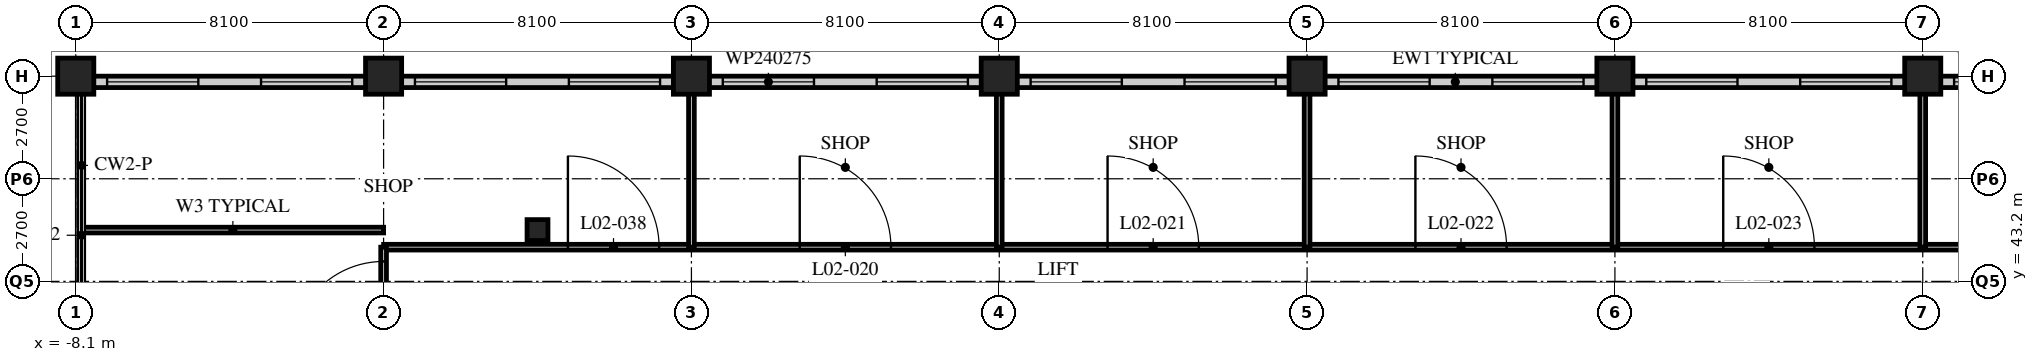
"""IFC4 building model, lengths in metres.
Left out: names, types, materials, properties, quantities, classifications, styles, units other than length and angle.
Written with IfcOpenShell. Run it as: python <this file> out.ifc"""

import sys

from ifc_helpers import new_model, si_unit, direction, frame, frame_2d, origin, origin_2d, place, context, subcontext, project, spatial, rectangle, hollow_rectangle, extrude, element, fill, save


model = new_model("IFC4")
c1 = context("Model", 3, precision=1e-05, world=origin(), true_north=direction((0.0, 1.0)))
c2 = subcontext(c1, "Body", "Model", "MODEL_VIEW")
j1 = project(units=[si_unit("LENGTHUNIT", "METRE"), si_unit("PLANEANGLEUNIT", "RADIAN")], contexts=[c1])
p1 = place(None, origin())
s1 = spatial("IfcSite", under=j1, at=p1, CompositionType="ELEMENT")
p2 = place(p1, origin())
s2 = spatial("IfcBuilding", under=s1, at=p2, CompositionType="ELEMENT")
p3 = place(p2, frame((0.0, 0.0, 11.4)))
s3 = spatial("IfcBuildingStorey", under=s2, at=p3, CompositionType="ELEMENT", Elevation=11.4)
for number, where, z_axis, x_axis in (
    (1, (-8.1, 48.6, 0.0), (0.0, 0.0, 1.0), (1.0, 0.0, 0.0)),
    (2, (0.0, 48.6, 0.0), (0.0, 0.0, 1.0), (1.0, 0.0, 0.0)),
):
    element("IfcColumn", number, at=place(p3, frame(where, z_axis=z_axis, x_axis=x_axis)), inside=s3, PredefinedType="COLUMN", context=c2, shape_type="SweptSolid", body=[
        extrude(hollow_rectangle(XDim=0.95, YDim=0.95, WallThickness=0.1, at=origin_2d()), origin(), (0.0, 0.0, 1.0), 5.4),
    ])
p4 = place(p3, frame((4.05, 44.55, 0.0), z_axis=(0.0, 0.0, 1.0), x_axis=(1.0, 0.0, 0.0)))
e3 = element("IfcColumn", 3, at=p4, inside=s3, PredefinedType="COLUMN", context=c2, shape_type="SweptSolid", body=[
    extrude(hollow_rectangle(XDim=0.55, YDim=0.55, WallThickness=0.05, at=origin_2d()), origin(), (0.0, 0.0, 1.0), 5.4),
])
for number, where, z_axis, x_axis in (
    (4, (8.1, 48.6, 0.0), (0.0, 0.0, 1.0), (1.0, 0.0, 0.0)),
    (5, (16.2, 48.6, 0.0), (0.0, 0.0, 1.0), (1.0, 0.0, 0.0)),
    (6, (24.3, 48.6, 0.0), (0.0, 0.0, 1.0), (1.0, 0.0, 0.0)),
    (7, (32.4, 48.6, 0.0), (0.0, 0.0, 1.0), (1.0, 0.0, 0.0)),
    (8, (40.5, 48.6, 0.0), (0.0, 0.0, 1.0), (1.0, 0.0, 0.0)),
):
    element("IfcColumn", number, at=place(p3, frame(where, z_axis=z_axis, x_axis=x_axis)), inside=s3, PredefinedType="COLUMN", context=c2, shape_type="SweptSolid", body=[
        extrude(hollow_rectangle(XDim=0.95, YDim=0.95, WallThickness=0.1, at=origin_2d()), origin(), (0.0, 0.0, 1.0), 5.4),
    ])
p5 = place(p3, frame((64.5, 48.45, 0.0), z_axis=(0.0, 0.0, 1.0), x_axis=(-1.0, 0.0, 0.0)))
e9 = element("IfcWall", 9, at=p5, inside=s3, PredefinedType="SOLIDWALL", context=c2, shape_type="SweptSolid", body=[
    extrude(rectangle(XDim=72.6, YDim=0.3, at=frame_2d((36.3, 0.0))), origin(), (0.0, 0.0, 1.0), 5.15),
])
p6 = place(p5, frame((0.525, 0.0, 1.0)))
e10 = element("IfcOpeningElement", 10, at=p6, cuts=e9, PredefinedType="OPENING", context=c2, shape_type="SweptSolid", body=[
    extrude(rectangle(XDim=2.4, YDim=2.75, at=frame_2d((1.2, 1.375))), frame((0.0, 0.16, 0.0), z_axis=(0.0, -1.0, 0.0), x_axis=(1.0, 0.0, 0.0)), (0.0, 0.0, 1.0), 0.32),
])
p7 = place(p5, frame((4.575, 0.0, 1.0)))
e11 = element("IfcOpeningElement", 11, at=p7, cuts=e9, PredefinedType="OPENING", context=c2, shape_type="SweptSolid", body=[
    extrude(rectangle(XDim=2.4, YDim=2.75, at=frame_2d((1.2, 1.375))), frame((0.0, 0.16, 0.0), z_axis=(0.0, -1.0, 0.0), x_axis=(1.0, 0.0, 0.0)), (0.0, 0.0, 1.0), 0.32),
])
p8 = place(p5, frame((8.625, 0.0, 1.0)))
e12 = element("IfcOpeningElement", 12, at=p8, cuts=e9, PredefinedType="OPENING", context=c2, shape_type="SweptSolid", body=[
    extrude(rectangle(XDim=2.4, YDim=2.75, at=frame_2d((1.2, 1.375))), frame((0.0, 0.16, 0.0), z_axis=(0.0, -1.0, 0.0), x_axis=(1.0, 0.0, 0.0)), (0.0, 0.0, 1.0), 0.32),
])
p9 = place(p5, frame((12.675, 0.0, 1.0)))
e13 = element("IfcOpeningElement", 13, at=p9, cuts=e9, PredefinedType="OPENING", context=c2, shape_type="SweptSolid", body=[
    extrude(rectangle(XDim=2.4, YDim=2.75, at=frame_2d((1.2, 1.375))), frame((0.0, 0.16, 0.0), z_axis=(0.0, -1.0, 0.0), x_axis=(1.0, 0.0, 0.0)), (0.0, 0.0, 1.0), 0.32),
])
p10 = place(p5, frame((16.725, 0.0, 1.0)))
e14 = element("IfcOpeningElement", 14, at=p10, cuts=e9, PredefinedType="OPENING", context=c2, shape_type="SweptSolid", body=[
    extrude(rectangle(XDim=2.4, YDim=2.75, at=frame_2d((1.2, 1.375))), frame((0.0, 0.16, 0.0), z_axis=(0.0, -1.0, 0.0), x_axis=(1.0, 0.0, 0.0)), (0.0, 0.0, 1.0), 0.32),
])
p11 = place(p5, frame((20.775, 0.0, 1.0)))
e15 = element("IfcOpeningElement", 15, at=p11, cuts=e9, PredefinedType="OPENING", context=c2, shape_type="SweptSolid", body=[
    extrude(rectangle(XDim=2.4, YDim=2.75, at=frame_2d((1.2, 1.375))), frame((0.0, 0.16, 0.0), z_axis=(0.0, -1.0, 0.0), x_axis=(1.0, 0.0, 0.0)), (0.0, 0.0, 1.0), 0.32),
])
p12 = place(p5, frame((24.825, 0.0, 1.0)))
e16 = element("IfcOpeningElement", 16, at=p12, cuts=e9, PredefinedType="OPENING", context=c2, shape_type="SweptSolid", body=[
    extrude(rectangle(XDim=2.4, YDim=2.75, at=frame_2d((1.2, 1.375))), frame((0.0, 0.16, 0.0), z_axis=(0.0, -1.0, 0.0), x_axis=(1.0, 0.0, 0.0)), (0.0, 0.0, 1.0), 0.32),
])
p13 = place(p5, frame((28.875, 0.0, 1.0)))
e17 = element("IfcOpeningElement", 17, at=p13, cuts=e9, PredefinedType="OPENING", context=c2, shape_type="SweptSolid", body=[
    extrude(rectangle(XDim=2.4, YDim=2.75, at=frame_2d((1.2, 1.375))), frame((0.0, 0.16, 0.0), z_axis=(0.0, -1.0, 0.0), x_axis=(1.0, 0.0, 0.0)), (0.0, 0.0, 1.0), 0.32),
])
p14 = place(p5, frame((32.925, 0.0, 1.0)))
e18 = element("IfcOpeningElement", 18, at=p14, cuts=e9, PredefinedType="OPENING", context=c2, shape_type="SweptSolid", body=[
    extrude(rectangle(XDim=2.4, YDim=2.75, at=frame_2d((1.2, 1.375))), frame((0.0, 0.16, 0.0), z_axis=(0.0, -1.0, 0.0), x_axis=(1.0, 0.0, 0.0)), (0.0, 0.0, 1.0), 0.32),
])
p15 = place(p5, frame((36.975, 0.0, 1.0)))
e19 = element("IfcOpeningElement", 19, at=p15, cuts=e9, PredefinedType="OPENING", context=c2, shape_type="SweptSolid", body=[
    extrude(rectangle(XDim=2.4, YDim=2.75, at=frame_2d((1.2, 1.375))), frame((0.0, 0.16, 0.0), z_axis=(0.0, -1.0, 0.0), x_axis=(1.0, 0.0, 0.0)), (0.0, 0.0, 1.0), 0.32),
])
p16 = place(p5, frame((41.025, 0.0, 1.0)))
e20 = element("IfcOpeningElement", 20, at=p16, cuts=e9, PredefinedType="OPENING", context=c2, shape_type="SweptSolid", body=[
    extrude(rectangle(XDim=2.4, YDim=2.75, at=frame_2d((1.2, 1.375))), frame((0.0, 0.16, 0.0), z_axis=(0.0, -1.0, 0.0), x_axis=(1.0, 0.0, 0.0)), (0.0, 0.0, 1.0), 0.32),
])
p17 = place(p5, frame((45.075, 0.0, 1.0)))
e21 = element("IfcOpeningElement", 21, at=p17, cuts=e9, PredefinedType="OPENING", context=c2, shape_type="SweptSolid", body=[
    extrude(rectangle(XDim=2.4, YDim=2.75, at=frame_2d((1.2, 1.375))), frame((0.0, 0.16, 0.0), z_axis=(0.0, -1.0, 0.0), x_axis=(1.0, 0.0, 0.0)), (0.0, 0.0, 1.0), 0.32),
])
p18 = place(p5, frame((49.125, 0.0, 1.0)))
e22 = element("IfcOpeningElement", 22, at=p18, cuts=e9, PredefinedType="OPENING", context=c2, shape_type="SweptSolid", body=[
    extrude(rectangle(XDim=2.4, YDim=2.75, at=frame_2d((1.2, 1.375))), frame((0.0, 0.16, 0.0), z_axis=(0.0, -1.0, 0.0), x_axis=(1.0, 0.0, 0.0)), (0.0, 0.0, 1.0), 0.32),
])
p19 = place(p5, frame((53.175, 0.0, 1.0)))
e23 = element("IfcOpeningElement", 23, at=p19, cuts=e9, PredefinedType="OPENING", context=c2, shape_type="SweptSolid", body=[
    extrude(rectangle(XDim=2.4, YDim=2.75, at=frame_2d((1.2, 1.375))), frame((0.0, 0.16, 0.0), z_axis=(0.0, -1.0, 0.0), x_axis=(1.0, 0.0, 0.0)), (0.0, 0.0, 1.0), 0.32),
])
p20 = place(p5, frame((57.225, 0.0, 1.0)))
e24 = element("IfcOpeningElement", 24, at=p20, cuts=e9, PredefinedType="OPENING", context=c2, shape_type="SweptSolid", body=[
    extrude(rectangle(XDim=2.4, YDim=2.75, at=frame_2d((1.2, 1.375))), frame((0.0, 0.16, 0.0), z_axis=(0.0, -1.0, 0.0), x_axis=(1.0, 0.0, 0.0)), (0.0, 0.0, 1.0), 0.32),
])
p21 = place(p5, frame((61.275, 0.0, 1.0)))
e25 = element("IfcOpeningElement", 25, at=p21, cuts=e9, PredefinedType="OPENING", context=c2, shape_type="SweptSolid", body=[
    extrude(rectangle(XDim=2.4, YDim=2.75, at=frame_2d((1.2, 1.375))), frame((0.0, 0.16, 0.0), z_axis=(0.0, -1.0, 0.0), x_axis=(1.0, 0.0, 0.0)), (0.0, 0.0, 1.0), 0.32),
])
p22 = place(p5, frame((65.325, 0.0, 1.0)))
e26 = element("IfcOpeningElement", 26, at=p22, cuts=e9, PredefinedType="OPENING", context=c2, shape_type="SweptSolid", body=[
    extrude(rectangle(XDim=2.4, YDim=2.75, at=frame_2d((1.2, 1.375))), frame((0.0, 0.16, 0.0), z_axis=(0.0, -1.0, 0.0), x_axis=(1.0, 0.0, 0.0)), (0.0, 0.0, 1.0), 0.32),
])
p23 = place(p5, frame((69.375, 0.0, 1.0)))
e27 = element("IfcOpeningElement", 27, at=p23, cuts=e9, PredefinedType="OPENING", context=c2, shape_type="SweptSolid", body=[
    extrude(rectangle(XDim=2.4, YDim=2.75, at=frame_2d((1.2, 1.375))), frame((0.0, 0.16, 0.0), z_axis=(0.0, -1.0, 0.0), x_axis=(1.0, 0.0, 0.0)), (0.0, 0.0, 1.0), 0.32),
])
p24 = place(p3, frame((0.0, 44.1, 0.0), z_axis=(0.0, 0.0, 1.0), x_axis=(1.0, 0.0, 0.0)))
e28 = element("IfcWall", 28, at=p24, inside=s3, PredefinedType="PARTITIONING", context=c2, shape_type="SweptSolid", body=[
    extrude(rectangle(XDim=56.7, YDim=0.15, at=frame_2d((28.35, 0.0))), origin(), (0.0, 0.0, 1.0), 5.15),
])
p25 = place(p24, frame((10.95, 0.0, 0.0)))
e29 = element("IfcOpeningElement", 29, at=p25, cuts=e28, PredefinedType="OPENING", context=c2, shape_type="SweptSolid", body=[
    extrude(rectangle(XDim=2.4, YDim=2.7, at=frame_2d((1.2, 1.35))), frame((0.0, 0.085, 0.0), z_axis=(0.0, -1.0, 0.0), x_axis=(1.0, 0.0, 0.0)), (0.0, 0.0, 1.0), 0.17),
])
p26 = place(p24, frame((19.05, 0.0, 0.0)))
e30 = element("IfcOpeningElement", 30, at=p26, cuts=e28, PredefinedType="OPENING", context=c2, shape_type="SweptSolid", body=[
    extrude(rectangle(XDim=2.4, YDim=2.7, at=frame_2d((1.2, 1.35))), frame((0.0, 0.085, 0.0), z_axis=(0.0, -1.0, 0.0), x_axis=(1.0, 0.0, 0.0)), (0.0, 0.0, 1.0), 0.17),
])
p27 = place(p24, frame((27.15, 0.0, 0.0)))
e31 = element("IfcOpeningElement", 31, at=p27, cuts=e28, PredefinedType="OPENING", context=c2, shape_type="SweptSolid", body=[
    extrude(rectangle(XDim=2.4, YDim=2.7, at=frame_2d((1.2, 1.35))), frame((0.0, 0.085, 0.0), z_axis=(0.0, -1.0, 0.0), x_axis=(1.0, 0.0, 0.0)), (0.0, 0.0, 1.0), 0.17),
])
p28 = place(p24, frame((35.25, 0.0, 0.0)))
e32 = element("IfcOpeningElement", 32, at=p28, cuts=e28, PredefinedType="OPENING", context=c2, shape_type="SweptSolid", body=[
    extrude(rectangle(XDim=2.4, YDim=2.7, at=frame_2d((1.2, 1.35))), frame((0.0, 0.085, 0.0), z_axis=(0.0, -1.0, 0.0), x_axis=(1.0, 0.0, 0.0)), (0.0, 0.0, 1.0), 0.17),
])
p29 = place(p24, frame((43.35, 0.0, 0.0)))
e33 = element("IfcOpeningElement", 33, at=p29, cuts=e28, PredefinedType="OPENING", context=c2, shape_type="SweptSolid", body=[
    extrude(rectangle(XDim=2.4, YDim=2.7, at=frame_2d((1.2, 1.35))), frame((0.0, 0.085, 0.0), z_axis=(0.0, -1.0, 0.0), x_axis=(1.0, 0.0, 0.0)), (0.0, 0.0, 1.0), 0.17),
])
p30 = place(p24, frame((53.45, 0.0, 0.0)))
e34 = element("IfcOpeningElement", 34, at=p30, cuts=e28, PredefinedType="OPENING", context=c2, shape_type="SweptSolid", body=[
    extrude(rectangle(XDim=2.4, YDim=2.7, at=frame_2d((1.2, 1.35))), frame((0.0, 0.085, 0.0), z_axis=(0.0, -1.0, 0.0), x_axis=(1.0, 0.0, 0.0)), (0.0, 0.0, 1.0), 0.17),
])
p31 = place(p24, frame((4.85, 0.0, 0.0)))
e35 = element("IfcOpeningElement", 35, at=p31, cuts=e28, PredefinedType="OPENING", context=c2, shape_type="SweptSolid", body=[
    extrude(rectangle(XDim=2.4, YDim=2.7, at=frame_2d((1.2, 1.35))), frame((0.0, 0.085, 0.0), z_axis=(0.0, -1.0, 0.0), x_axis=(1.0, 0.0, 0.0)), (0.0, 0.0, 1.0), 0.17),
])
p32 = place(p3, frame((0.0, 8.1, 0.0), z_axis=(0.0, 0.0, 1.0), x_axis=(0.0, 1.0, 0.0)))
e36 = element("IfcWall", 36, at=p32, inside=s3, PredefinedType="PARTITIONING", context=c2, shape_type="SweptSolid", body=[
    extrude(rectangle(XDim=36.0, YDim=0.15, at=frame_2d((18.0, 0.0))), origin(), (0.0, 0.0, 1.0), 4.538),
])
p33 = place(p32, frame((2.85, 0.0, 0.0)))
e37 = element("IfcOpeningElement", 37, at=p33, cuts=e36, PredefinedType="OPENING", context=c2, shape_type="SweptSolid", body=[
    extrude(rectangle(XDim=2.4, YDim=2.7, at=frame_2d((1.2, 1.35))), frame((0.0, 0.085, 0.0), z_axis=(0.0, -1.0, 0.0), x_axis=(1.0, 0.0, 0.0)), (0.0, 0.0, 1.0), 0.17),
])
p34 = place(p32, frame((10.95, 0.0, 0.0)))
e38 = element("IfcOpeningElement", 38, at=p34, cuts=e36, PredefinedType="OPENING", context=c2, shape_type="SweptSolid", body=[
    extrude(rectangle(XDim=2.4, YDim=2.7, at=frame_2d((1.2, 1.35))), frame((0.0, 0.085, 0.0), z_axis=(0.0, -1.0, 0.0), x_axis=(1.0, 0.0, 0.0)), (0.0, 0.0, 1.0), 0.17),
])
p35 = place(p32, frame((19.05, 0.0, 0.0)))
e39 = element("IfcOpeningElement", 39, at=p35, cuts=e36, PredefinedType="OPENING", context=c2, shape_type="SweptSolid", body=[
    extrude(rectangle(XDim=2.4, YDim=2.7, at=frame_2d((1.2, 1.35))), frame((0.0, 0.085, 0.0), z_axis=(0.0, -1.0, 0.0), x_axis=(1.0, 0.0, 0.0)), (0.0, 0.0, 1.0), 0.17),
])
p36 = place(p32, frame((27.15, 0.0, 0.0)))
e40 = element("IfcOpeningElement", 40, at=p36, cuts=e36, PredefinedType="OPENING", context=c2, shape_type="SweptSolid", body=[
    extrude(rectangle(XDim=2.4, YDim=2.7, at=frame_2d((1.2, 1.35))), frame((0.0, 0.085, 0.0), z_axis=(0.0, -1.0, 0.0), x_axis=(1.0, 0.0, 0.0)), (0.0, 0.0, 1.0), 0.17),
])
p37 = place(p32, frame((33.225, 0.0, 0.0)))
e41 = element("IfcOpeningElement", 41, at=p37, cuts=e36, PredefinedType="OPENING", context=c2, shape_type="SweptSolid", body=[
    extrude(rectangle(XDim=2.4, YDim=2.7, at=frame_2d((1.2, 1.35))), frame((0.0, 0.085, 0.0), z_axis=(0.0, -1.0, 0.0), x_axis=(1.0, 0.0, 0.0)), (0.0, 0.0, 1.0), 0.17),
])
for number, where, z_axis, x_axis in (
    (42, (16.2, 44.1, 0.0), (0.0, 0.0, 1.0), (0.0, 1.0, 0.0)),
    (43, (24.3, 44.1, 0.0), (0.0, 0.0, 1.0), (0.0, 1.0, 0.0)),
    (44, (32.4, 44.1, 0.0), (0.0, 0.0, 1.0), (0.0, 1.0, 0.0)),
    (45, (40.5, 44.1, 0.0), (0.0, 0.0, 1.0), (0.0, 1.0, 0.0)),
):
    element("IfcWall", number, at=place(p3, frame(where, z_axis=z_axis, x_axis=x_axis)), inside=s3, PredefinedType="PARTITIONING", context=c2, shape_type="SweptSolid", body=[
        extrude(rectangle(XDim=4.2, YDim=0.15, at=frame_2d((2.1, 0.0))), origin(), (0.0, 0.0, 1.0), 4.538),
    ])
p38 = place(p3, frame((-7.932, 44.55, 0.0), z_axis=(0.0, 0.0, 1.0), x_axis=(1.0, 0.0, 0.0)))
e46 = element("IfcWall", 46, at=p38, inside=s3, PredefinedType="PARTITIONING", context=c2, shape_type="SweptSolid", body=[
    extrude(rectangle(XDim=7.932, YDim=0.15, at=frame_2d((3.966, 0.0))), origin(), (0.0, 0.0, 1.0), 5.15),
])
p39 = place(p3, frame((8.1, 44.1, 0.0), z_axis=(0.0, 0.0, 1.0), x_axis=(0.0, 1.0, 0.0)))
e47 = element("IfcWall", 47, at=p39, inside=s3, PredefinedType="PARTITIONING", context=c2, shape_type="SweptSolid", body=[
    extrude(rectangle(XDim=4.2, YDim=0.15, at=frame_2d((2.1, 0.0))), origin(), (0.0, 0.0, 1.0), 4.538),
])
p40 = place(p11, origin())
e48 = element("IfcWindow", 48, at=p40, inside=s3, PartitioningType="SINGLE_PANEL", PredefinedType="WINDOW", context=c2, shape_type="SweptSolid", body=[
    extrude(rectangle(XDim=2.4, YDim=2.75, at=frame_2d((1.2, 1.375))), frame((0.0, 0.03, 0.0), z_axis=(0.0, -1.0, 0.0), x_axis=(1.0, 0.0, 0.0)), (0.0, 0.0, 1.0), 0.06),
])
fill(e15, e48)
p41 = place(p12, origin())
e49 = element("IfcWindow", 49, at=p41, inside=s3, PartitioningType="SINGLE_PANEL", PredefinedType="WINDOW", context=c2, shape_type="SweptSolid", body=[
    extrude(rectangle(XDim=2.4, YDim=2.75, at=frame_2d((1.2, 1.375))), frame((0.0, 0.03, 0.0), z_axis=(0.0, -1.0, 0.0), x_axis=(1.0, 0.0, 0.0)), (0.0, 0.0, 1.0), 0.06),
])
fill(e16, e49)
p42 = place(p13, origin())
e50 = element("IfcWindow", 50, at=p42, inside=s3, PartitioningType="SINGLE_PANEL", PredefinedType="WINDOW", context=c2, shape_type="SweptSolid", body=[
    extrude(rectangle(XDim=2.4, YDim=2.75, at=frame_2d((1.2, 1.375))), frame((0.0, 0.03, 0.0), z_axis=(0.0, -1.0, 0.0), x_axis=(1.0, 0.0, 0.0)), (0.0, 0.0, 1.0), 0.06),
])
fill(e17, e50)
p43 = place(p14, origin())
e51 = element("IfcWindow", 51, at=p43, inside=s3, PartitioningType="SINGLE_PANEL", PredefinedType="WINDOW", context=c2, shape_type="SweptSolid", body=[
    extrude(rectangle(XDim=2.4, YDim=2.75, at=frame_2d((1.2, 1.375))), frame((0.0, 0.03, 0.0), z_axis=(0.0, -1.0, 0.0), x_axis=(1.0, 0.0, 0.0)), (0.0, 0.0, 1.0), 0.06),
])
fill(e18, e51)
p44 = place(p15, origin())
e52 = element("IfcWindow", 52, at=p44, inside=s3, PartitioningType="SINGLE_PANEL", PredefinedType="WINDOW", context=c2, shape_type="SweptSolid", body=[
    extrude(rectangle(XDim=2.4, YDim=2.75, at=frame_2d((1.2, 1.375))), frame((0.0, 0.03, 0.0), z_axis=(0.0, -1.0, 0.0), x_axis=(1.0, 0.0, 0.0)), (0.0, 0.0, 1.0), 0.06),
])
fill(e19, e52)
p45 = place(p16, origin())
e53 = element("IfcWindow", 53, at=p45, inside=s3, PartitioningType="SINGLE_PANEL", PredefinedType="WINDOW", context=c2, shape_type="SweptSolid", body=[
    extrude(rectangle(XDim=2.4, YDim=2.75, at=frame_2d((1.2, 1.375))), frame((0.0, 0.03, 0.0), z_axis=(0.0, -1.0, 0.0), x_axis=(1.0, 0.0, 0.0)), (0.0, 0.0, 1.0), 0.06),
])
fill(e20, e53)
p46 = place(p17, origin())
e54 = element("IfcWindow", 54, at=p46, inside=s3, PartitioningType="SINGLE_PANEL", PredefinedType="WINDOW", context=c2, shape_type="SweptSolid", body=[
    extrude(rectangle(XDim=2.4, YDim=2.75, at=frame_2d((1.2, 1.375))), frame((0.0, 0.03, 0.0), z_axis=(0.0, -1.0, 0.0), x_axis=(1.0, 0.0, 0.0)), (0.0, 0.0, 1.0), 0.06),
])
fill(e21, e54)
p47 = place(p18, origin())
e55 = element("IfcWindow", 55, at=p47, inside=s3, PartitioningType="SINGLE_PANEL", PredefinedType="WINDOW", context=c2, shape_type="SweptSolid", body=[
    extrude(rectangle(XDim=2.4, YDim=2.75, at=frame_2d((1.2, 1.375))), frame((0.0, 0.03, 0.0), z_axis=(0.0, -1.0, 0.0), x_axis=(1.0, 0.0, 0.0)), (0.0, 0.0, 1.0), 0.06),
])
fill(e22, e55)
p48 = place(p19, origin())
e56 = element("IfcWindow", 56, at=p48, inside=s3, PartitioningType="SINGLE_PANEL", PredefinedType="WINDOW", context=c2, shape_type="SweptSolid", body=[
    extrude(rectangle(XDim=2.4, YDim=2.75, at=frame_2d((1.2, 1.375))), frame((0.0, 0.03, 0.0), z_axis=(0.0, -1.0, 0.0), x_axis=(1.0, 0.0, 0.0)), (0.0, 0.0, 1.0), 0.06),
])
fill(e23, e56)
p49 = place(p20, origin())
e57 = element("IfcWindow", 57, at=p49, inside=s3, PartitioningType="SINGLE_PANEL", PredefinedType="WINDOW", context=c2, shape_type="SweptSolid", body=[
    extrude(rectangle(XDim=2.4, YDim=2.75, at=frame_2d((1.2, 1.375))), frame((0.0, 0.03, 0.0), z_axis=(0.0, -1.0, 0.0), x_axis=(1.0, 0.0, 0.0)), (0.0, 0.0, 1.0), 0.06),
])
fill(e24, e57)
p50 = place(p21, origin())
e58 = element("IfcWindow", 58, at=p50, inside=s3, PartitioningType="SINGLE_PANEL", PredefinedType="WINDOW", context=c2, shape_type="SweptSolid", body=[
    extrude(rectangle(XDim=2.4, YDim=2.75, at=frame_2d((1.2, 1.375))), frame((0.0, 0.03, 0.0), z_axis=(0.0, -1.0, 0.0), x_axis=(1.0, 0.0, 0.0)), (0.0, 0.0, 1.0), 0.06),
])
fill(e25, e58)
p51 = place(p22, origin())
e59 = element("IfcWindow", 59, at=p51, inside=s3, PartitioningType="SINGLE_PANEL", PredefinedType="WINDOW", context=c2, shape_type="SweptSolid", body=[
    extrude(rectangle(XDim=2.4, YDim=2.75, at=frame_2d((1.2, 1.375))), frame((0.0, 0.03, 0.0), z_axis=(0.0, -1.0, 0.0), x_axis=(1.0, 0.0, 0.0)), (0.0, 0.0, 1.0), 0.06),
])
fill(e26, e59)
p52 = place(p23, origin())
e60 = element("IfcWindow", 60, at=p52, inside=s3, PartitioningType="SINGLE_PANEL", PredefinedType="WINDOW", context=c2, shape_type="SweptSolid", body=[
    extrude(rectangle(XDim=2.4, YDim=2.75, at=frame_2d((1.2, 1.375))), frame((0.0, 0.03, 0.0), z_axis=(0.0, -1.0, 0.0), x_axis=(1.0, 0.0, 0.0)), (0.0, 0.0, 1.0), 0.06),
])
fill(e27, e60)
p53 = place(p25, origin())
e61 = element("IfcDoor", 61, at=p53, inside=s3, OperationType="DOUBLE_DOOR_SINGLE_SWING", PredefinedType="DOOR", context=c2, shape_type="SweptSolid", body=[
    extrude(rectangle(XDim=2.4, YDim=2.7, at=frame_2d((1.2, 1.35))), frame((0.0, 0.025, 0.0), z_axis=(0.0, -1.0, 0.0), x_axis=(1.0, 0.0, 0.0)), (0.0, 0.0, 1.0), 0.05),
])
fill(e29, e61)
p54 = place(p26, origin())
e62 = element("IfcDoor", 62, at=p54, inside=s3, OperationType="DOUBLE_DOOR_SINGLE_SWING", PredefinedType="DOOR", context=c2, shape_type="SweptSolid", body=[
    extrude(rectangle(XDim=2.4, YDim=2.7, at=frame_2d((1.2, 1.35))), frame((0.0, 0.025, 0.0), z_axis=(0.0, -1.0, 0.0), x_axis=(1.0, 0.0, 0.0)), (0.0, 0.0, 1.0), 0.05),
])
fill(e30, e62)
p55 = place(p27, origin())
e63 = element("IfcDoor", 63, at=p55, inside=s3, OperationType="DOUBLE_DOOR_SINGLE_SWING", PredefinedType="DOOR", context=c2, shape_type="SweptSolid", body=[
    extrude(rectangle(XDim=2.4, YDim=2.7, at=frame_2d((1.2, 1.35))), frame((0.0, 0.025, 0.0), z_axis=(0.0, -1.0, 0.0), x_axis=(1.0, 0.0, 0.0)), (0.0, 0.0, 1.0), 0.05),
])
fill(e31, e63)
p56 = place(p28, origin())
e64 = element("IfcDoor", 64, at=p56, inside=s3, OperationType="DOUBLE_DOOR_SINGLE_SWING", PredefinedType="DOOR", context=c2, shape_type="SweptSolid", body=[
    extrude(rectangle(XDim=2.4, YDim=2.7, at=frame_2d((1.2, 1.35))), frame((0.0, 0.025, 0.0), z_axis=(0.0, -1.0, 0.0), x_axis=(1.0, 0.0, 0.0)), (0.0, 0.0, 1.0), 0.05),
])
fill(e32, e64)
p57 = place(p37, origin())
e65 = element("IfcDoor", 65, at=p57, inside=s3, OperationType="DOUBLE_DOOR_SINGLE_SWING", PredefinedType="DOOR", context=c2, shape_type="SweptSolid", body=[
    extrude(rectangle(XDim=2.4, YDim=2.7, at=frame_2d((1.2, 1.35))), frame((0.0, 0.025, 0.0), z_axis=(0.0, -1.0, 0.0), x_axis=(1.0, 0.0, 0.0)), (0.0, 0.0, 1.0), 0.05),
])
fill(e41, e65)
p58 = place(p31, origin())
e66 = element("IfcDoor", 66, at=p58, inside=s3, OperationType="DOUBLE_DOOR_SINGLE_SWING", PredefinedType="DOOR", context=c2, shape_type="SweptSolid", body=[
    extrude(rectangle(XDim=2.4, YDim=2.7, at=frame_2d((1.2, 1.35))), frame((0.0, 0.025, 0.0), z_axis=(0.0, -1.0, 0.0), x_axis=(1.0, 0.0, 0.0)), (0.0, 0.0, 1.0), 0.05),
])
fill(e35, e66)
save(model, sys.argv[1])
